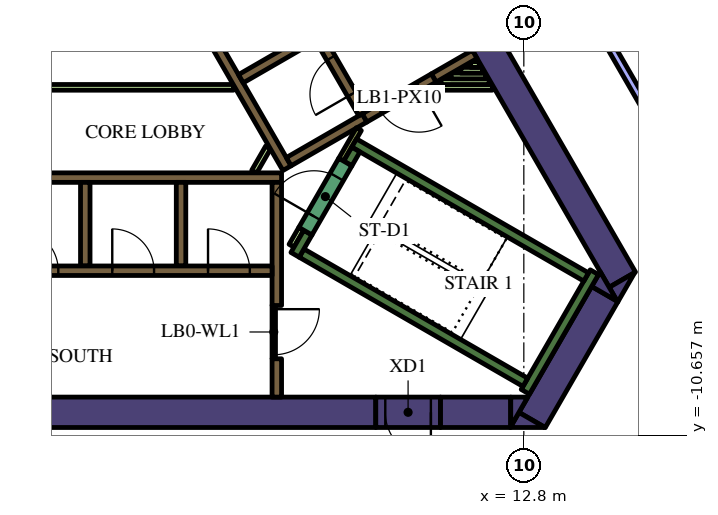
"""IFC4 building model, lengths in metres.
Left out: names, types, materials, properties, quantities, classifications, styles, units other than length and angle.
Written with IfcOpenShell. Run it as: python <this file> out.ifc"""

import sys

from ifc_helpers import new_model, si_unit, direction, frame, frame_2d, origin, place, context, subcontext, project, spatial, polyline, rectangle, outline, extrude, element, fill, save


model = new_model("IFC4")
c1 = context("Model", 3, precision=1e-05, world=origin(), true_north=direction((0.0, 1.0)))
c2 = subcontext(c1, "Body", "Model", "MODEL_VIEW")
j1 = project(units=[si_unit("LENGTHUNIT", "METRE"), si_unit("PLANEANGLEUNIT", "RADIAN")], contexts=[c1])
p1 = place(None, origin())
s1 = spatial("IfcSite", under=j1, at=p1, CompositionType="ELEMENT")
p2 = place(p1, origin())
s2 = spatial("IfcBuilding", under=s1, at=p2, CompositionType="ELEMENT")
p3 = place(p2, frame((0.0, 0.0, 175.2)))
s3 = spatial("IfcBuildingStorey", under=s2, at=p3, CompositionType="ELEMENT", Elevation=175.2)
p4 = place(p3, frame((9.129, 4.289, 0.0), z_axis=(0.0, 0.0, 1.0), x_axis=(0.499995742806, -0.866027861663, 0.0)))
e1 = element("IfcWall", 1, at=p4, inside=s3, PredefinedType="SOLIDWALL", context=c2, shape_type="SweptSolid", body=[
    extrude(rectangle(XDim=12.527, YDim=0.8, at=frame_2d((6.264, 0.0))), origin(), (0.0, 0.0, 1.0), 4.2),
])
p5 = place(p3, origin())
e2 = element("IfcWall", 2, at=p5, inside=s3, PredefinedType="SOLIDWALL", context=c2, shape_type="SweptSolid", body=[
    extrude(outline(polyline([(15.271, -7.15), (15.047, -6.762), (15.719, -6.374), (15.271, -7.15)])), origin(), (0.0, 0.0, 1.0), 4.2),
])
p6 = place(p3, frame((13.018, -10.252, 0.0), z_axis=(0.0, 0.0, 1.0), x_axis=(0.499984020225, 0.866034629516, 0.0)))
e3 = element("IfcWall", 3, at=p6, inside=s3, PredefinedType="SOLIDWALL", context=c2, shape_type="SweptSolid", body=[
    extrude(rectangle(XDim=3.824, YDim=0.8, at=frame_2d((1.912, 0.0))), origin(), (0.0, 0.0, 1.0), 4.2),
])
e4 = element("IfcWall", 4, at=p5, inside=s3, PredefinedType="SOLIDWALL", context=c2, shape_type="SweptSolid", body=[
    extrude(outline(polyline([(12.442, -10.45), (12.671, -10.053), (13.358, -10.45), (12.442, -10.45)])), origin(), (0.0, 0.0, 1.0), 4.2),
])
e5 = element("IfcWall", 5, at=p5, inside=s3, PredefinedType="SOLIDWALL", context=c2, shape_type="SweptSolid", body=[
    extrude(outline(polyline([(14.809, -6.35), (15.257, -7.126), (14.585, -6.738), (14.809, -6.35)])), origin(), (0.0, 0.0, 1.0), 4.2),
])
p7 = place(p3, frame((10.604, -10.05, 0.0), z_axis=(0.0, 0.0, 1.0), x_axis=(1.0, 0.0, 0.0)))
e6 = element("IfcWall", 6, at=p7, inside=s3, PredefinedType="SOLIDWALL", context=c2, shape_type="SweptSolid", body=[
    extrude(rectangle(XDim=1.849, YDim=0.8, at=frame_2d((0.925, 0.0))), origin(), (0.0, 0.0, 1.0), 4.2),
])
e7 = element("IfcWall", 7, at=p5, inside=s3, PredefinedType="SOLIDWALL", context=c2, shape_type="SweptSolid", body=[
    extrude(outline(polyline([(12.904, -9.65), (12.456, -10.426), (12.456, -9.65), (12.904, -9.65)])), origin(), (0.0, 0.0, 1.0), 4.2),
])
p8 = place(p3, frame((-13.378, -10.05, 0.0), z_axis=(0.0, 0.0, 1.0), x_axis=(1.0, 0.0, 0.0)))
e8 = element("IfcWall", 8, at=p8, inside=s3, PredefinedType="SOLIDWALL", context=c2, shape_type="SweptSolid", body=[
    extrude(rectangle(XDim=22.282, YDim=0.8, at=frame_2d((11.141, 0.0))), origin(), (0.0, 0.0, 1.0), 4.2),
])
p9 = place(p3, frame((12.84, -9.511, 0.0), z_axis=(0.0, 0.0, 1.0), x_axis=(0.499997733992, 0.866026712061, 0.0)))
e9 = element("IfcWall", 9, at=p9, inside=s3, PredefinedType="SOLIDWALL", context=c2, shape_type="SweptSolid", body=[
    extrude(rectangle(XDim=3.634, YDim=0.25, at=frame_2d((1.817, 0.0))), origin(), (0.0, 0.0, 1.0), 4.2),
])
p10 = place(p3, frame((12.84, -9.261, 0.0), z_axis=(0.0, 0.0, 1.0), x_axis=(-0.866013990052, 0.500019768644, 0.0)))
e10 = element("IfcWall", 10, at=p10, inside=s3, PredefinedType="SOLIDWALL", context=c2, shape_type="SweptSolid", body=[
    extrude(rectangle(XDim=6.8, YDim=0.25, at=frame_2d((3.4, 0.0))), origin(), (0.0, 0.0, 1.0), 4.2),
])
p11 = place(p3, frame((6.78, -5.906, 0.0), z_axis=(0.0, 0.0, 1.0), x_axis=(0.500223362819, 0.865896406789, 0.0)))
e11 = element("IfcWall", 11, at=p11, inside=s3, PredefinedType="SOLIDWALL", context=c2, shape_type="SweptSolid", body=[
    extrude(rectangle(XDim=0.675, YDim=0.25, at=frame_2d((0.337, 0.0))), origin(), (0.0, 0.0, 1.0), 4.2),
])
p12 = place(p3, frame((8.334, -2.964, 0.0), z_axis=(0.0, 0.0, 1.0), x_axis=(0.866016039709, -0.500016218704, 0.0)))
e12 = element("IfcWall", 12, at=p12, inside=s3, PredefinedType="SOLIDWALL", context=c2, shape_type="SweptSolid", body=[
    extrude(rectangle(XDim=7.05, YDim=0.25, at=frame_2d((3.525, 0.0))), origin(), (0.0, 0.0, 1.0), 4.2),
])
p13 = place(p3, frame((8.168, -3.503, 0.0), z_axis=(0.0, 0.0, 1.0), x_axis=(0.49972245349, 0.866185586049, 0.0)))
e13 = element("IfcWall", 13, at=p13, inside=s3, PredefinedType="SOLIDWALL", context=c2, shape_type="SweptSolid", body=[
    extrude(rectangle(XDim=0.425, YDim=0.25, at=frame_2d((0.212, 0.0))), origin(), (0.0, 0.0, 1.0), 4.2),
])
p14 = place(p3, frame((-5.545, -3.875, 0.0), z_axis=(0.0, 0.0, 1.0), x_axis=(1.0, 0.0, 0.0)))
e14 = element("IfcWall", 14, at=p14, inside=s3, PredefinedType="SOLIDWALL", context=c2, shape_type="SweptSolid", body=[
    extrude(rectangle(XDim=11.97, YDim=0.25, at=frame_2d((5.985, 0.0))), origin(), (0.0, 0.0, 1.0), 4.2),
])
p15 = place(p3, frame((6.3, -7.24, 0.0), z_axis=(0.0, 0.0, 1.0), x_axis=(0.0, 1.0, 0.0)))
e15 = element("IfcWall", 15, at=p15, inside=s3, PredefinedType="SOLIDWALL", context=c2, shape_type="SweptSolid", body=[
    extrude(rectangle(XDim=3.24, YDim=0.25, at=frame_2d((1.62, 0.0))), origin(), (0.0, 0.0, 1.0), 4.2),
])
p16 = place(p3, frame((6.3, -9.65, 0.0), z_axis=(0.0, 0.0, 1.0), x_axis=(0.0, 1.0, 0.0)))
e16 = element("IfcWall", 16, at=p16, inside=s3, PredefinedType="SOLIDWALL", context=c2, shape_type="SweptSolid", body=[
    extrude(rectangle(XDim=1.008, YDim=0.25, at=frame_2d((0.504, 0.0))), origin(), (0.0, 0.0, 1.0), 4.2),
])
for number, where, z_axis, x_axis in (
    (17, (3.78, -4.0, 0.0), (0.0, 0.0, 1.0), (0.0, -1.0, 0.0)),
    (18, (1.26, -4.0, 0.0), (0.0, 0.0, 1.0), (0.0, -1.0, 0.0)),
):
    element("IfcWall", number, at=place(p3, frame(where, z_axis=z_axis, x_axis=x_axis)), inside=s3, PredefinedType="SOLIDWALL", context=c2, shape_type="SweptSolid", body=[
        extrude(rectangle(XDim=2.2, YDim=0.25, at=frame_2d((1.1, 0.0))), origin(), (0.0, 0.0, 1.0), 4.2),
    ])
p17 = place(p3, frame((11.507, -0.631, 0.0), z_axis=(0.0, 0.0, 1.0), x_axis=(-0.866025525965, -0.499999788377, 0.0)))
e19 = element("IfcWall", 19, at=p17, inside=s3, PredefinedType="SOLIDWALL", context=c2, shape_type="SweptSolid", body=[
    extrude(rectangle(XDim=1.245, YDim=0.25, at=frame_2d((0.622, 0.0))), origin(), (0.0, 0.0, 1.0), 4.2),
])
p18 = place(p3, frame((6.568, -3.627, 0.0), z_axis=(0.0, 0.0, 1.0), x_axis=(-0.499999455981, 0.866025717874, 0.0)))
e20 = element("IfcWall", 20, at=p18, inside=s3, PredefinedType="SOLIDWALL", context=c2, shape_type="SweptSolid", body=[
    extrude(rectangle(XDim=11.978, YDim=0.25, at=frame_2d((5.989, 0.0))), origin(), (0.0, 0.0, 1.0), 4.2),
])
p19 = place(p3, frame((5.354, -1.274, 0.0), z_axis=(0.0, 0.0, 1.0), x_axis=(0.866008176907, 0.50002983664, 0.0)))
e21 = element("IfcWall", 21, at=p19, inside=s3, PredefinedType="SOLIDWALL", context=c2, shape_type="SweptSolid", body=[
    extrude(rectangle(XDim=2.2, YDim=0.25, at=frame_2d((1.1, 0.0))), origin(), (0.0, 0.0, 1.0), 4.2),
])
p20 = place(p3, frame((6.614, -3.456, 0.0), z_axis=(0.0, 0.0, 1.0), x_axis=(0.866025089694, 0.500000544019, 0.0)))
e22 = element("IfcWall", 22, at=p20, inside=s3, PredefinedType="SOLIDWALL", context=c2, shape_type="SweptSolid", body=[
    extrude(rectangle(XDim=2.305, YDim=0.25, at=frame_2d((1.153, 0.0))), origin(), (0.0, 0.0, 1.0), 4.2),
])
p21 = place(p3, frame((10.362, -1.5, 0.0), z_axis=(0.0, 0.0, 1.0), x_axis=(1.0, 0.0, 0.0)))
e23 = element("IfcWall", 23, at=p21, inside=s3, PredefinedType="PARTITIONING", context=c2, shape_type="SweptSolid", body=[
    extrude(rectangle(XDim=1.61, YDim=0.15, at=frame_2d((0.805, 0.0))), origin(), (0.0, 0.0, 1.0), 3.15),
])
p22 = place(p3, frame((10.622, -1.35, 0.0), z_axis=(0.0, 0.0, 1.0), x_axis=(1.0, 0.0, 0.0)))
e24 = element("IfcWall", 24, at=p22, inside=s3, PredefinedType="PARTITIONING", context=c2, shape_type="SweptSolid", body=[
    extrude(rectangle(XDim=1.263, YDim=0.15, at=frame_2d((0.632, 0.0))), origin(), (0.0, 0.0, 1.0), 3.15),
])
p23 = place(p3, frame((10.882, -1.2, 0.0), z_axis=(0.0, 0.0, 1.0), x_axis=(1.0, 0.0, 0.0)))
e25 = element("IfcWall", 25, at=p23, inside=s3, PredefinedType="PARTITIONING", context=c2, shape_type="SweptSolid", body=[
    extrude(rectangle(XDim=0.917, YDim=0.15, at=frame_2d((0.459, 0.0))), origin(), (0.0, 0.0, 1.0), 3.15),
])
p24 = place(p3, frame((11.712, -1.05, 0.0), z_axis=(0.0, 0.0, 1.0), x_axis=(-1.0, 0.0, 0.0)))
e26 = element("IfcWall", 26, at=p24, inside=s3, PredefinedType="PARTITIONING", context=c2, shape_type="SweptSolid", body=[
    extrude(rectangle(XDim=0.571, YDim=0.15, at=frame_2d((0.285, 0.0))), origin(), (0.0, 0.0, 1.0), 3.15),
])
p25 = place(p3, frame((11.401, -0.9, 0.0), z_axis=(0.0, 0.0, 1.0), x_axis=(1.0, 0.0, 0.0)))
e27 = element("IfcWall", 27, at=p25, inside=s3, PredefinedType="PARTITIONING", context=c2, shape_type="SweptSolid", body=[
    extrude(rectangle(XDim=0.224, YDim=0.15, at=frame_2d((0.112, 0.0))), origin(), (0.0, 0.0, 1.0), 3.15),
])
p26 = place(p3, frame((6.945, -5.222, 0.0), z_axis=(0.0, 0.0, 1.0), x_axis=(-0.499818422106, -0.866130212453, 0.0)))
e28 = element("IfcWall", 28, at=p26, inside=s3, PredefinedType="PARTITIONING", context=c2, shape_type="SweptSolid", body=[
    extrude(rectangle(XDim=0.514, YDim=0.15, at=frame_2d((0.257, 0.0))), origin(), (0.0, 0.0, 1.0), 3.15),
])
p27 = place(p3, frame((8.459, -2.599, 0.0), z_axis=(0.0, 0.0, 1.0), x_axis=(-0.500041054325, -0.866001699761, 0.0)))
e29 = element("IfcWall", 29, at=p27, inside=s3, PredefinedType="PARTITIONING", context=c2, shape_type="SweptSolid", body=[
    extrude(rectangle(XDim=0.929, YDim=0.15, at=frame_2d((0.464, 0.0))), origin(), (0.0, 0.0, 1.0), 4.2),
])
p28 = place(p3, frame((5.705, -3.718, 0.0), z_axis=(0.0, 0.0, 1.0), x_axis=(0.499962090823, 0.866047289552, 0.0)))
e30 = element("IfcWall", 30, at=p28, inside=s3, PredefinedType="PARTITIONING", context=c2, shape_type="SweptSolid", body=[
    extrude(rectangle(XDim=0.735, YDim=0.15, at=frame_2d((0.367, 0.0))), origin(), (0.0, 0.0, 1.0), 3.15),
])
p29 = place(p3, frame((-4.2, -1.5, 0.0), z_axis=(0.0, 0.0, 1.0), x_axis=(1.0, 0.0, 0.0)))
e31 = element("IfcWall", 31, at=p29, inside=s3, PredefinedType="PARTITIONING", context=c2, shape_type="SweptSolid", body=[
    extrude(rectangle(XDim=9.359, YDim=0.15, at=frame_2d((4.68, 0.0))), origin(), (0.0, 0.0, 1.0), 3.15),
])
p30 = place(p3, frame((-0.544, -1.393, 0.0), z_axis=(0.0, 0.0, 1.0), x_axis=(0.499928740635, 0.866066541489, 0.0)))
e32 = element("IfcWall", 32, at=p30, inside=s3, PredefinedType="PARTITIONING", context=c2, shape_type="SweptSolid", body=[
    extrude(rectangle(XDim=1.912, YDim=0.15, at=frame_2d((0.956, 0.0))), origin(), (0.0, 0.0, 1.0), 3.15),
])
p31 = place(p3, frame((-6.175, -6.325, 0.0), z_axis=(0.0, 0.0, 1.0), x_axis=(1.0, 0.0, 0.0)))
e33 = element("IfcWall", 33, at=p31, inside=s3, PredefinedType="SOLIDWALL", context=c2, shape_type="SweptSolid", body=[
    extrude(rectangle(XDim=12.35, YDim=0.25, at=frame_2d((6.175, 0.0))), origin(), (0.0, 0.0, 1.0), 4.2),
])
p32 = place(p31, frame((0.585, 0.0, 0.0)))
e34 = element("IfcOpeningElement", 34, at=p32, cuts=e33, PredefinedType="OPENING", context=c2, shape_type="SweptSolid", body=[
    extrude(rectangle(XDim=1.1, YDim=2.1, at=frame_2d((0.55, 1.05))), frame((0.0, 0.135, 0.0), z_axis=(0.0, -1.0, 0.0), x_axis=(1.0, 0.0, 0.0)), (0.0, 0.0, 1.0), 0.27),
])
p33 = place(p31, frame((3.105, 0.0, 0.0)))
e35 = element("IfcOpeningElement", 35, at=p33, cuts=e33, PredefinedType="OPENING", context=c2, shape_type="SweptSolid", body=[
    extrude(rectangle(XDim=1.1, YDim=2.1, at=frame_2d((0.55, 1.05))), frame((0.0, 0.135, 0.0), z_axis=(0.0, -1.0, 0.0), x_axis=(1.0, 0.0, 0.0)), (0.0, 0.0, 1.0), 0.27),
])
p34 = place(p31, frame((5.625, 0.0, 0.0)))
e36 = element("IfcOpeningElement", 36, at=p34, cuts=e33, PredefinedType="OPENING", context=c2, shape_type="SweptSolid", body=[
    extrude(rectangle(XDim=1.1, YDim=2.1, at=frame_2d((0.55, 1.05))), frame((0.0, 0.135, 0.0), z_axis=(0.0, -1.0, 0.0), x_axis=(1.0, 0.0, 0.0)), (0.0, 0.0, 1.0), 0.27),
])
p35 = place(p31, frame((8.145, 0.0, 0.0)))
e37 = element("IfcOpeningElement", 37, at=p35, cuts=e33, PredefinedType="OPENING", context=c2, shape_type="SweptSolid", body=[
    extrude(rectangle(XDim=1.1, YDim=2.1, at=frame_2d((0.55, 1.05))), frame((0.0, 0.135, 0.0), z_axis=(0.0, -1.0, 0.0), x_axis=(1.0, 0.0, 0.0)), (0.0, 0.0, 1.0), 0.27),
])
p36 = place(p31, frame((10.665, 0.0, 0.0)))
e38 = element("IfcOpeningElement", 38, at=p36, cuts=e33, PredefinedType="OPENING", context=c2, shape_type="SweptSolid", body=[
    extrude(rectangle(XDim=1.1, YDim=2.1, at=frame_2d((0.55, 1.05))), frame((0.0, 0.135, 0.0), z_axis=(0.0, -1.0, 0.0), x_axis=(1.0, 0.0, 0.0)), (0.0, 0.0, 1.0), 0.27),
])
p37 = place(p3, frame((8.565, -2.185, 0.0), z_axis=(0.0, 0.0, 1.0), x_axis=(-0.499997954832, 0.866026584559, 0.0)))
e39 = element("IfcWall", 39, at=p37, inside=s3, PredefinedType="SOLIDWALL", context=c2, shape_type="SweptSolid", body=[
    extrude(rectangle(XDim=12.35, YDim=0.25, at=frame_2d((6.175, 0.0))), origin(), (0.0, 0.0, 1.0), 4.2),
])
p38 = place(p37, frame((0.585, 0.0, 0.0)))
e40 = element("IfcOpeningElement", 40, at=p38, cuts=e39, PredefinedType="OPENING", context=c2, shape_type="SweptSolid", body=[
    extrude(rectangle(XDim=1.1, YDim=2.1, at=frame_2d((0.55, 1.05))), frame((0.0, 0.135, 0.0), z_axis=(0.0, -1.0, 0.0), x_axis=(1.0, 0.0, 0.0)), (0.0, 0.0, 1.0), 0.27),
])
p39 = place(p3, frame((7.053, -5.284, 0.0), z_axis=(0.0, 0.0, 1.0), x_axis=(0.500078061341, 0.865980330357, 0.0)))
e41 = element("IfcWall", 41, at=p39, inside=s3, PredefinedType="SOLIDWALL", context=c2, shape_type="SweptSolid", body=[
    extrude(rectangle(XDim=2.1, YDim=0.4, at=frame_2d((1.05, 0.0))), origin(), (0.0, 0.0, 1.0), 4.2),
])
p40 = place(p39, frame((0.45, 0.0, 0.0)))
e42 = element("IfcOpeningElement", 42, at=p40, cuts=e41, PredefinedType="OPENING", context=c2, shape_type="SweptSolid", body=[
    extrude(rectangle(XDim=1.2, YDim=2.1, at=frame_2d((0.6, 1.05))), frame((0.0, 0.21, 0.0), z_axis=(0.0, -1.0, 0.0), x_axis=(1.0, 0.0, 0.0)), (0.0, 0.0, 1.0), 0.42),
])
p41 = place(p3, frame((6.22, -7.237, 0.0), z_axis=(0.0, 0.0, 1.0), x_axis=(0.0, -1.0, 0.0)))
e43 = element("IfcWall", 43, at=p41, inside=s3, PredefinedType="PARTITIONING", context=c2, shape_type="SweptSolid", body=[
    extrude(rectangle(XDim=1.4, YDim=0.09, at=frame_2d((0.7, 0.0))), origin(), (0.0, 0.0, 1.0), 3.15),
])
p42 = place(p41, frame((0.1, 0.0, 0.0)))
e44 = element("IfcOpeningElement", 44, at=p42, cuts=e43, PredefinedType="OPENING", context=c2, shape_type="SweptSolid", body=[
    extrude(rectangle(XDim=1.2, YDim=2.1, at=frame_2d((0.6, 1.05))), frame((0.0, 0.055, 0.0), z_axis=(0.0, -1.0, 0.0), x_axis=(1.0, 0.0, 0.0)), (0.0, 0.0, 1.0), 0.11),
])
p43 = place(p3, frame((10.429, -1.253, 0.0), z_axis=(0.0, 0.0, 1.0), x_axis=(-0.866009402589, -0.500027713859, 0.0)))
e45 = element("IfcWall", 45, at=p43, inside=s3, PredefinedType="SOLIDWALL", context=c2, shape_type="SweptSolid", body=[
    extrude(rectangle(XDim=2.1, YDim=0.25, at=frame_2d((1.05, 0.0))), origin(), (0.0, 0.0, 1.0), 4.2),
])
p44 = place(p43, frame((0.45, 0.0, 0.0)))
e46 = element("IfcOpeningElement", 46, at=p44, cuts=e45, PredefinedType="OPENING", context=c2, shape_type="SweptSolid", body=[
    extrude(rectangle(XDim=1.2, YDim=2.1, at=frame_2d((0.6, 1.05))), frame((0.0, 0.135, 0.0), z_axis=(0.0, -1.0, 0.0), x_axis=(1.0, 0.0, 0.0)), (0.0, 0.0, 1.0), 0.27),
])
p45 = place(p3, frame((10.604, -10.05, 0.0), z_axis=(0.0, 0.0, 1.0), x_axis=(-1.0, 0.0, 0.0)))
e47 = element("IfcWall", 47, at=p45, inside=s3, PredefinedType="SOLIDWALL", context=c2, shape_type="SweptSolid", body=[
    extrude(rectangle(XDim=1.7, YDim=0.8, at=frame_2d((0.85, 0.0))), origin(), (0.0, 0.0, 1.0), 4.2),
])
p46 = place(p45, frame((0.25, 0.0, 0.0)))
e48 = element("IfcOpeningElement", 48, at=p46, cuts=e47, PredefinedType="OPENING", context=c2, shape_type="SweptSolid", body=[
    extrude(rectangle(XDim=1.2, YDim=2.1, at=frame_2d((0.6, 1.05))), frame((0.0, 0.41, 0.0), z_axis=(0.0, -1.0, 0.0), x_axis=(1.0, 0.0, 0.0)), (0.0, 0.0, 1.0), 0.82),
])
p47 = place(p3, frame((14.766, -12.824, 0.0), z_axis=(0.0, 0.0, 1.0), x_axis=(0.500009869004, 0.866019705837, 0.0)))
e49 = element("IfcWall", 49, at=p47, inside=s3, PredefinedType="PARTITIONING", context=c2, shape_type="SweptSolid", body=[
    extrude(rectangle(XDim=7.475, YDim=0.2, at=frame_2d((3.738, 0.0))), origin(), (0.0, 0.0, 1.0), 3.15),
])
p48 = place(p3, frame((18.489, -6.324, 0.0), z_axis=(0.0, 0.0, 1.0), x_axis=(-0.500003913404, 0.866023144368, 0.0)))
e50 = element("IfcWall", 50, at=p48, inside=s3, PredefinedType="PARTITIONING", context=c2, shape_type="SweptSolid", body=[
    extrude(rectangle(XDim=8.234, YDim=0.2, at=frame_2d((4.117, 0.0))), origin(), (0.0, 0.0, 1.0), 3.15),
])
p49 = place(p34, origin())
e51 = element("IfcDoor", 51, at=p49, inside=s3, OperationType="DOUBLE_DOOR_SLIDING", PredefinedType="DOOR", context=c2, shape_type="SweptSolid", body=[
    extrude(rectangle(XDim=1.1, YDim=2.1, at=frame_2d((0.55, 1.05))), frame((0.0, 0.025, 0.0), z_axis=(0.0, -1.0, 0.0), x_axis=(1.0, 0.0, 0.0)), (0.0, 0.0, 1.0), 0.05),
])
fill(e36, e51)
p50 = place(p35, origin())
e52 = element("IfcDoor", 52, at=p50, inside=s3, OperationType="DOUBLE_DOOR_SLIDING", PredefinedType="DOOR", context=c2, shape_type="SweptSolid", body=[
    extrude(rectangle(XDim=1.1, YDim=2.1, at=frame_2d((0.55, 1.05))), frame((0.0, 0.025, 0.0), z_axis=(0.0, -1.0, 0.0), x_axis=(1.0, 0.0, 0.0)), (0.0, 0.0, 1.0), 0.05),
])
fill(e37, e52)
p51 = place(p36, origin())
e53 = element("IfcDoor", 53, at=p51, inside=s3, OperationType="DOUBLE_DOOR_SLIDING", PredefinedType="DOOR", context=c2, shape_type="SweptSolid", body=[
    extrude(rectangle(XDim=1.1, YDim=2.1, at=frame_2d((0.55, 1.05))), frame((0.0, 0.025, 0.0), z_axis=(0.0, -1.0, 0.0), x_axis=(1.0, 0.0, 0.0)), (0.0, 0.0, 1.0), 0.05),
])
fill(e38, e53)
p52 = place(p38, origin())
e54 = element("IfcDoor", 54, at=p52, inside=s3, OperationType="DOUBLE_DOOR_SLIDING", PredefinedType="DOOR", context=c2, shape_type="SweptSolid", body=[
    extrude(rectangle(XDim=1.1, YDim=2.1, at=frame_2d((0.55, 1.05))), frame((0.0, 0.025, 0.0), z_axis=(0.0, -1.0, 0.0), x_axis=(1.0, 0.0, 0.0)), (0.0, 0.0, 1.0), 0.05),
])
fill(e40, e54)
p53 = place(p40, origin())
e55 = element("IfcDoor", 55, at=p53, inside=s3, OperationType="SINGLE_SWING_LEFT", PredefinedType="DOOR", context=c2, shape_type="SweptSolid", body=[
    extrude(rectangle(XDim=1.2, YDim=2.1, at=frame_2d((0.6, 1.05))), frame((0.0, 0.025, 0.0), z_axis=(0.0, -1.0, 0.0), x_axis=(1.0, 0.0, 0.0)), (0.0, 0.0, 1.0), 0.05),
])
fill(e42, e55)
p54 = place(p42, origin())
e56 = element("IfcDoor", 56, at=p54, inside=s3, OperationType="SINGLE_SWING_LEFT", PredefinedType="DOOR", context=c2, shape_type="SweptSolid", body=[
    extrude(rectangle(XDim=1.2, YDim=2.1, at=frame_2d((0.6, 1.05))), frame((0.0, 0.025, 0.0), z_axis=(0.0, -1.0, 0.0), x_axis=(1.0, 0.0, 0.0)), (0.0, 0.0, 1.0), 0.05),
])
fill(e44, e56)
p55 = place(p44, origin())
e57 = element("IfcDoor", 57, at=p55, inside=s3, OperationType="SINGLE_SWING_LEFT", PredefinedType="DOOR", context=c2, shape_type="SweptSolid", body=[
    extrude(rectangle(XDim=1.2, YDim=2.1, at=frame_2d((0.6, 1.05))), frame((0.0, 0.025, 0.0), z_axis=(0.0, -1.0, 0.0), x_axis=(1.0, 0.0, 0.0)), (0.0, 0.0, 1.0), 0.05),
])
fill(e46, e57)
p56 = place(p46, origin())
e58 = element("IfcDoor", 58, at=p56, inside=s3, OperationType="SINGLE_SWING_LEFT", PredefinedType="DOOR", context=c2, shape_type="SweptSolid", body=[
    extrude(rectangle(XDim=1.2, YDim=2.1, at=frame_2d((0.6, 1.05))), frame((0.0, 0.025, 0.0), z_axis=(0.0, -1.0, 0.0), x_axis=(1.0, 0.0, 0.0)), (0.0, 0.0, 1.0), 0.05),
])
fill(e48, e58)
save(model, sys.argv[1])
